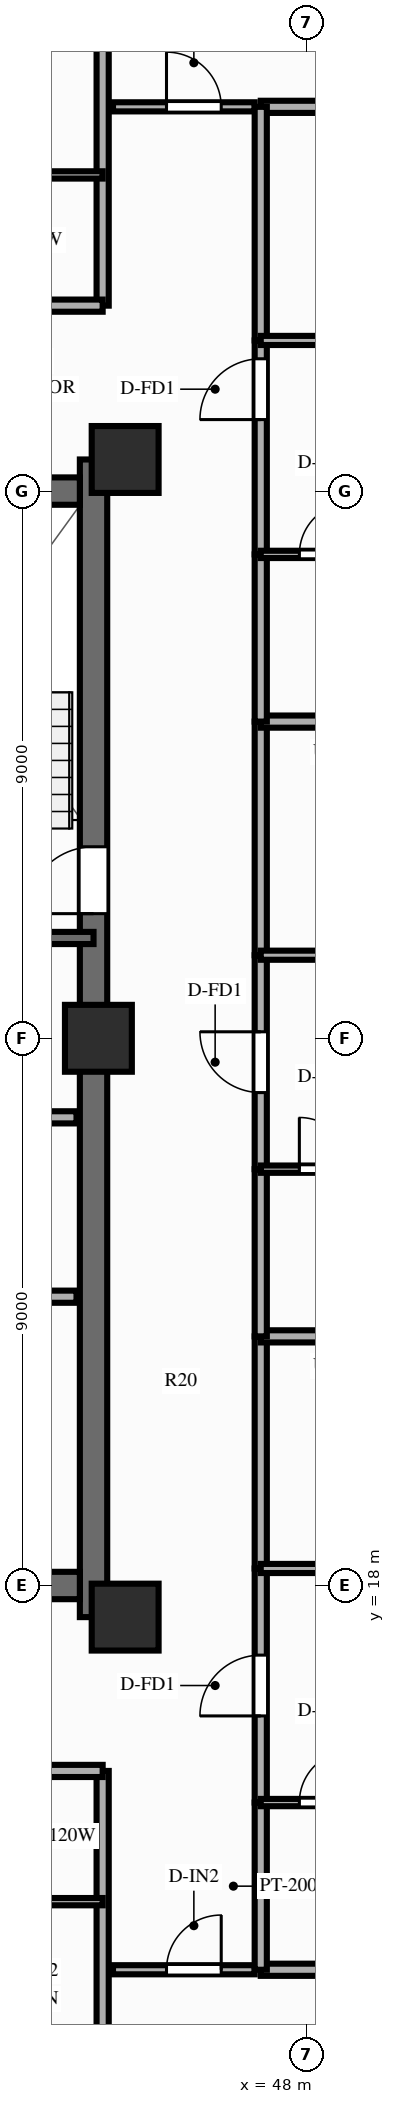
"""IFC4 building model, lengths in metres.
Left out: names, types, materials, properties, quantities, classifications, styles, units other than length and angle.
Written with IfcOpenShell. Run it as: python <this file> out.ifc"""

import sys

from ifc_helpers import new_model, si_unit, direction, frame, frame_2d, origin, origin_2d, place, context, subcontext, project, spatial, rectangle, extrude, source, transform, mapped, element, fill, save


model = new_model("IFC4")
c1 = context("Model", 3, precision=1e-05, world=origin(), true_north=direction((0.0, 1.0)))
c2 = subcontext(c1, "Body", "Model", "MODEL_VIEW")
j1 = project(units=[si_unit("LENGTHUNIT", "METRE"), si_unit("PLANEANGLEUNIT", "RADIAN")], contexts=[c1])
p1 = place(None, origin())
s1 = spatial("IfcSite", under=j1, at=p1, CompositionType="ELEMENT")
p2 = place(p1, origin())
s2 = spatial("IfcBuilding", under=s1, at=p2, CompositionType="ELEMENT")
p3 = place(p2, frame((0.0, 0.0, 199.6)))
s3 = spatial("IfcBuildingStorey", under=s2, at=p3, CompositionType="ELEMENT", Elevation=199.6)
p4 = place(p3, frame((44.5, 17.48, 0.0), z_axis=(0.0, 0.0, 1.0), x_axis=(0.0, 1.0, 0.0)))
e1 = element("IfcWall", 1, at=p4, inside=s3, PredefinedType="SHEAR", context=c2, shape_type="SweptSolid", body=[
    extrude(rectangle(XDim=19.04, YDim=0.45, at=frame_2d((9.52, 0.0))), origin(), (0.0, 0.0, 1.0), 3.0),
])
p5 = place(p4, frame((12.67, 0.0, 0.0), z_axis=(0.0, 0.0, 1.0), x_axis=(-1.0, 0.0, 0.0)))
e2 = element("IfcOpeningElement", 2, at=p5, cuts=e1, PredefinedType="OPENING", context=c2, shape_type="SweptSolid", body=[
    extrude(rectangle(XDim=1.1, YDim=2.15, at=frame_2d((0.55, 1.075))), frame((0.0, 0.237, 0.0), z_axis=(0.0, -1.0, 0.0), x_axis=(1.0, 0.0, 0.0)), (0.0, 0.0, 1.0), 0.474),
])
p6 = place(p3, frame((31.725, 18.0, 0.0), z_axis=(0.0, 0.0, 1.0), x_axis=(1.0, 0.0, 0.0)))
e3 = element("IfcWall", 3, at=p6, inside=s3, PredefinedType="SHEAR", context=c2, shape_type="SweptSolid", body=[
    extrude(rectangle(XDim=12.55, YDim=0.45, at=frame_2d((6.275, 0.0))), origin(), (0.0, 0.0, 1.0), 3.0),
])
p7 = place(p3, frame((31.725, 36.0, 0.0), z_axis=(0.0, 0.0, 1.0), x_axis=(1.0, 0.0, 0.0)))
e4 = element("IfcWall", 4, at=p7, inside=s3, PredefinedType="SHEAR", context=c2, shape_type="SweptSolid", body=[
    extrude(rectangle(XDim=12.55, YDim=0.45, at=frame_2d((6.275, 0.0))), origin(), (0.0, 0.0, 1.0), 3.0),
])
p8 = place(p7, frame((5.225, 0.0, 0.0), z_axis=(0.0, 0.0, 1.0), x_axis=(-1.0, 0.0, 0.0)))
e5 = element("IfcOpeningElement", 5, at=p8, cuts=e4, PredefinedType="OPENING", context=c2, shape_type="SweptSolid", body=[
    extrude(rectangle(XDim=1.4, YDim=2.15, at=frame_2d((0.7, 1.075))), frame((0.0, 0.237, 0.0), z_axis=(0.0, -1.0, 0.0), x_axis=(1.0, 0.0, 0.0)), (0.0, 0.0, 1.0), 0.474),
])
m1 = source(origin(), c2, "Body", "SweptSolid", [
    extrude(rectangle(XDim=1.1, YDim=1.1, at=origin_2d()), origin(), (0.0, 0.0, 1.0), 3.0),
])
for number, where, z_axis, x_axis in (
    (6, (45.02, 17.48, 0.0), (0.0, 0.0, 1.0), (1.0, 0.0, 0.0)),
    (7, (45.02, 36.52, 0.0), (0.0, 0.0, 1.0), (1.0, 0.0, 0.0)),
    (8, (44.58, 27.0, 0.0), (0.0, 0.0, 1.0), (1.0, 0.0, 0.0)),
):
    element("IfcColumn", number, at=place(p3, frame(where, z_axis=z_axis, x_axis=x_axis)), inside=s3, PredefinedType="COLUMN", context=c2, shape_type="MappedRepresentation", body=[
        mapped(m1, transform((0.0, 0.0, 0.0), scale=1.0)),
    ])
p9 = place(p3, frame((41.55, 22.75, 0.0), z_axis=(0.0, 0.0, 1.0), x_axis=(1.0, 0.0, 0.0)))
e9 = element("IfcWall", 9, at=p9, inside=s3, PredefinedType="PARTITIONING", context=c2, shape_type="SweptSolid", body=[
    extrude(rectangle(XDim=2.67, YDim=0.2, at=frame_2d((1.335, 0.0))), origin(), (0.0, 0.0, 1.0), 2.79),
])
p10 = place(p3, frame((41.55, 25.7, 0.0), z_axis=(0.0, 0.0, 1.0), x_axis=(1.0, 0.0, 0.0)))
e10 = element("IfcWall", 10, at=p10, inside=s3, PredefinedType="PARTITIONING", context=c2, shape_type="SweptSolid", body=[
    extrude(rectangle(XDim=2.67, YDim=0.2, at=frame_2d((1.335, 0.0))), origin(), (0.0, 0.0, 1.0), 2.14),
])
p11 = place(p3, frame((40.57, 28.65, 0.0), z_axis=(0.0, 0.0, 1.0), x_axis=(1.0, 0.0, 0.0)))
e11 = element("IfcWall", 11, at=p11, inside=s3, PredefinedType="SOLIDWALL", context=c2, shape_type="SweptSolid", body=[
    extrude(rectangle(XDim=3.93, YDim=0.2, at=frame_2d((1.965, 0.0))), origin(), (0.0, 0.0, 1.0), 2.79),
])
p12 = place(p3, frame((44.82, 11.68, 0.0), z_axis=(0.0, 0.0, 1.0), x_axis=(1.0, 0.0, 0.0)))
e12 = element("IfcWall", 12, at=p12, inside=s3, PredefinedType="PARTITIONING", context=c2, shape_type="SweptSolid", body=[
    extrude(rectangle(XDim=2.33, YDim=0.15, at=frame_2d((1.165, 0.0))), origin(), (0.0, 0.0, 1.0), 2.79),
])
p13 = place(p12, frame((0.88, 0.0, 0.0)))
e13 = element("IfcOpeningElement", 13, at=p13, cuts=e12, PredefinedType="OPENING", context=c2, shape_type="SweptSolid", body=[
    extrude(rectangle(XDim=0.9, YDim=2.1, at=frame_2d((0.45, 1.05))), frame((0.0, 0.087, 0.0), z_axis=(0.0, -1.0, 0.0), x_axis=(1.0, 0.0, 0.0)), (0.0, 0.0, 1.0), 0.174),
])
p14 = place(p3, frame((44.82, 42.32, 0.0), z_axis=(0.0, 0.0, 1.0), x_axis=(1.0, 0.0, 0.0)))
e14 = element("IfcWall", 14, at=p14, inside=s3, PredefinedType="PARTITIONING", context=c2, shape_type="SweptSolid", body=[
    extrude(rectangle(XDim=2.33, YDim=0.15, at=frame_2d((1.165, 0.0))), origin(), (0.0, 0.0, 1.0), 2.79),
])
p15 = place(p14, frame((0.88, 0.0, 0.0)))
e15 = element("IfcOpeningElement", 15, at=p15, cuts=e14, PredefinedType="OPENING", context=c2, shape_type="SweptSolid", body=[
    extrude(rectangle(XDim=0.9, YDim=2.1, at=frame_2d((0.45, 1.05))), frame((0.0, 0.087, 0.0), z_axis=(0.0, -1.0, 0.0), x_axis=(1.0, 0.0, 0.0)), (0.0, 0.0, 1.0), 0.174),
])
p16 = place(p3, frame((44.65, 14.95, 0.0), z_axis=(0.0, 0.0, 1.0), x_axis=(0.0, -1.0, 0.0)))
e16 = element("IfcWall", 16, at=p16, inside=s3, PredefinedType="PARTITIONING", context=c2, shape_type="SweptSolid", body=[
    extrude(rectangle(XDim=8.8, YDim=0.2, at=frame_2d((4.4, 0.0))), origin(), (0.0, 0.0, 1.0), 2.39),
])
p17 = place(p3, frame((41.8, 14.95, 0.0), z_axis=(0.0, 0.0, 1.0), x_axis=(1.0, 0.0, 0.0)))
e17 = element("IfcWall", 17, at=p17, inside=s3, PredefinedType="PARTITIONING", context=c2, shape_type="SweptSolid", body=[
    extrude(rectangle(XDim=2.85, YDim=0.2, at=frame_2d((1.425, 0.0))), origin(), (0.0, 0.0, 1.0), 2.79),
])
p18 = place(p3, frame((41.8, 12.8, 0.0), z_axis=(0.0, 0.0, 1.0), x_axis=(1.0, 0.0, 0.0)))
e18 = element("IfcWall", 18, at=p18, inside=s3, PredefinedType="PARTITIONING", context=c2, shape_type="SweptSolid", body=[
    extrude(rectangle(XDim=2.85, YDim=0.12, at=frame_2d((1.425, 0.0))), origin(), (0.0, 0.0, 1.0), 2.79),
])
p19 = place(p3, frame((44.65, 39.05, 0.0), z_axis=(0.0, 0.0, 1.0), x_axis=(0.0, 1.0, 0.0)))
e19 = element("IfcWall", 19, at=p19, inside=s3, PredefinedType="PARTITIONING", context=c2, shape_type="SweptSolid", body=[
    extrude(rectangle(XDim=8.8, YDim=0.2, at=frame_2d((4.4, 0.0))), origin(), (0.0, 0.0, 1.0), 2.39),
])
p20 = place(p3, frame((42.085, 39.05, 0.0), z_axis=(0.0, 0.0, 1.0), x_axis=(1.0, 0.0, 0.0)))
e20 = element("IfcWall", 20, at=p20, inside=s3, PredefinedType="PARTITIONING", context=c2, shape_type="SweptSolid", body=[
    extrude(rectangle(XDim=2.564, YDim=0.2, at=frame_2d((1.282, 0.0))), origin(), (0.0, 0.0, 1.0), 2.79),
])
p21 = place(p3, frame((42.085, 41.2, 0.0), z_axis=(0.0, 0.0, 1.0), x_axis=(1.0, 0.0, 0.0)))
e21 = element("IfcWall", 21, at=p21, inside=s3, PredefinedType="PARTITIONING", context=c2, shape_type="SweptSolid", body=[
    extrude(rectangle(XDim=2.564, YDim=0.12, at=frame_2d((1.282, 0.0))), origin(), (0.0, 0.0, 1.0), 2.79),
])
for number, where, z_axis, x_axis in (
    (22, (47.25, 11.68, 0.0), (0.0, 0.0, 1.0), (1.0, 0.0, 0.0)),
    (23, (47.25, 42.32, 0.0), (0.0, 0.0, 1.0), (1.0, 0.0, 0.0)),
):
    element("IfcWall", number, at=place(p3, frame(where, z_axis=z_axis, x_axis=x_axis)), inside=s3, PredefinedType="PARTITIONING", context=c2, shape_type="SweptSolid", body=[
        extrude(rectangle(XDim=9.1, YDim=0.2, at=frame_2d((4.55, 0.0))), origin(), (0.0, 0.0, 1.0), 2.79),
    ])
p22 = place(p3, frame((47.25, 11.68, 0.0), z_axis=(0.0, 0.0, 1.0), x_axis=(0.0, 1.0, 0.0)))
e24 = element("IfcWall", 24, at=p22, inside=s3, PredefinedType="PARTITIONING", context=c2, shape_type="SweptSolid", body=[
    extrude(rectangle(XDim=2.75, YDim=0.2, at=frame_2d((1.375, 0.0))), origin(), (0.0, 0.0, 1.0), 2.79),
])
p23 = place(p3, frame((47.25, 14.43, 0.0), z_axis=(0.0, 0.0, 1.0), x_axis=(0.0, 1.0, 0.0)))
e25 = element("IfcWall", 25, at=p23, inside=s3, PredefinedType="PARTITIONING", context=c2, shape_type="SweptSolid", body=[
    extrude(rectangle(XDim=3.85, YDim=0.2, at=frame_2d((1.925, 0.0))), origin(), (0.0, 0.0, 1.0), 2.79),
])
p24 = place(p23, frame((1.425, 0.0, 0.0)))
e26 = element("IfcOpeningElement", 26, at=p24, cuts=e25, PredefinedType="OPENING", context=c2, shape_type="SweptSolid", body=[
    extrude(rectangle(XDim=1.0, YDim=2.15, at=frame_2d((0.5, 1.075))), frame((0.0, 0.112, 0.0), z_axis=(0.0, -1.0, 0.0), x_axis=(1.0, 0.0, 0.0)), (0.0, 0.0, 1.0), 0.224),
])
p25 = place(p3, frame((47.25, 18.28, 0.0), z_axis=(0.0, 0.0, 1.0), x_axis=(0.0, 1.0, 0.0)))
e27 = element("IfcWall", 27, at=p25, inside=s3, PredefinedType="PARTITIONING", context=c2, shape_type="SweptSolid", body=[
    extrude(rectangle(XDim=3.818, YDim=0.2, at=frame_2d((1.909, 0.0))), origin(), (0.0, 0.0, 1.0), 2.79),
])
p26 = place(p3, frame((47.25, 14.43, 0.0), z_axis=(0.0, 0.0, 1.0), x_axis=(1.0, 0.0, 0.0)))
e28 = element("IfcWall", 28, at=p26, inside=s3, PredefinedType="PARTITIONING", context=c2, shape_type="SweptSolid", body=[
    extrude(rectangle(XDim=2.12, YDim=0.12, at=frame_2d((1.06, 0.0))), origin(), (0.0, 0.0, 1.0), 2.79),
])
p27 = place(p26, frame((0.635, 0.0, 0.0)))
e29 = element("IfcOpeningElement", 29, at=p27, cuts=e28, PredefinedType="OPENING", context=c2, shape_type="SweptSolid", body=[
    extrude(rectangle(XDim=0.85, YDim=2.05, at=frame_2d((0.425, 1.025))), frame((0.0, 0.072, 0.0), z_axis=(0.0, -1.0, 0.0), x_axis=(1.0, 0.0, 0.0)), (0.0, 0.0, 1.0), 0.144),
])
p28 = place(p3, frame((47.25, 18.28, 0.0), z_axis=(0.0, 0.0, 1.0), x_axis=(1.0, 0.0, 0.0)))
e30 = element("IfcWall", 30, at=p28, inside=s3, PredefinedType="PARTITIONING", context=c2, shape_type="SweptSolid", body=[
    extrude(rectangle(XDim=3.08, YDim=0.15, at=frame_2d((1.54, 0.0))), origin(), (0.0, 0.0, 1.0), 2.79),
])
p29 = place(p28, frame((1.09, 0.0, 0.0)))
e31 = element("IfcOpeningElement", 31, at=p29, cuts=e30, PredefinedType="OPENING", context=c2, shape_type="SweptSolid", body=[
    extrude(rectangle(XDim=0.9, YDim=2.1, at=frame_2d((0.45, 1.05))), frame((0.0, 0.087, 0.0), z_axis=(0.0, -1.0, 0.0), x_axis=(1.0, 0.0, 0.0)), (0.0, 0.0, 1.0), 0.174),
])
p30 = place(p3, frame((47.25, 22.098, 0.0), z_axis=(0.0, 0.0, 1.0), x_axis=(1.0, 0.0, 0.0)))
e32 = element("IfcWall", 32, at=p30, inside=s3, PredefinedType="PARTITIONING", context=c2, shape_type="SweptSolid", body=[
    extrude(rectangle(XDim=9.1, YDim=0.2, at=frame_2d((4.55, 0.0))), origin(), (0.0, 0.0, 1.0), 2.39),
])
p31 = place(p3, frame((47.25, 22.098, 0.0), z_axis=(0.0, 0.0, 1.0), x_axis=(0.0, 1.0, 0.0)))
e33 = element("IfcWall", 33, at=p31, inside=s3, PredefinedType="PARTITIONING", context=c2, shape_type="SweptSolid", body=[
    extrude(rectangle(XDim=2.75, YDim=0.2, at=frame_2d((1.375, 0.0))), origin(), (0.0, 0.0, 1.0), 2.79),
])
p32 = place(p3, frame((47.25, 24.848, 0.0), z_axis=(0.0, 0.0, 1.0), x_axis=(0.0, 1.0, 0.0)))
e34 = element("IfcWall", 34, at=p32, inside=s3, PredefinedType="PARTITIONING", context=c2, shape_type="SweptSolid", body=[
    extrude(rectangle(XDim=3.519, YDim=0.2, at=frame_2d((1.759, 0.0))), origin(), (0.0, 0.0, 1.0), 2.79),
])
p33 = place(p32, frame((1.26, 0.0, 0.0)))
e35 = element("IfcOpeningElement", 35, at=p33, cuts=e34, PredefinedType="OPENING", context=c2, shape_type="SweptSolid", body=[
    extrude(rectangle(XDim=1.0, YDim=2.15, at=frame_2d((0.5, 1.075))), frame((0.0, 0.112, 0.0), z_axis=(0.0, -1.0, 0.0), x_axis=(1.0, 0.0, 0.0)), (0.0, 0.0, 1.0), 0.224),
])
p34 = place(p3, frame((47.25, 28.366, 0.0), z_axis=(0.0, 0.0, 1.0), x_axis=(0.0, 1.0, 0.0)))
e36 = element("IfcWall", 36, at=p34, inside=s3, PredefinedType="PARTITIONING", context=c2, shape_type="SweptSolid", body=[
    extrude(rectangle(XDim=3.842, YDim=0.2, at=frame_2d((1.921, 0.0))), origin(), (0.0, 0.0, 1.0), 2.79),
])
p35 = place(p3, frame((47.25, 24.848, 0.0), z_axis=(0.0, 0.0, 1.0), x_axis=(1.0, 0.0, 0.0)))
e37 = element("IfcWall", 37, at=p35, inside=s3, PredefinedType="PARTITIONING", context=c2, shape_type="SweptSolid", body=[
    extrude(rectangle(XDim=2.12, YDim=0.12, at=frame_2d((1.06, 0.0))), origin(), (0.0, 0.0, 1.0), 2.79),
])
p36 = place(p35, frame((0.635, 0.0, 0.0)))
e38 = element("IfcOpeningElement", 38, at=p36, cuts=e37, PredefinedType="OPENING", context=c2, shape_type="SweptSolid", body=[
    extrude(rectangle(XDim=0.85, YDim=2.05, at=frame_2d((0.425, 1.025))), frame((0.0, 0.072, 0.0), z_axis=(0.0, -1.0, 0.0), x_axis=(1.0, 0.0, 0.0)), (0.0, 0.0, 1.0), 0.144),
])
p37 = place(p3, frame((47.25, 28.366, 0.0), z_axis=(0.0, 0.0, 1.0), x_axis=(1.0, 0.0, 0.0)))
e39 = element("IfcWall", 39, at=p37, inside=s3, PredefinedType="PARTITIONING", context=c2, shape_type="SweptSolid", body=[
    extrude(rectangle(XDim=3.08, YDim=0.15, at=frame_2d((1.54, 0.0))), origin(), (0.0, 0.0, 1.0), 2.79),
])
p38 = place(p37, frame((1.09, 0.0, 0.0)))
e40 = element("IfcOpeningElement", 40, at=p38, cuts=e39, PredefinedType="OPENING", context=c2, shape_type="SweptSolid", body=[
    extrude(rectangle(XDim=0.9, YDim=2.1, at=frame_2d((0.45, 1.05))), frame((0.0, 0.087, 0.0), z_axis=(0.0, -1.0, 0.0), x_axis=(1.0, 0.0, 0.0)), (0.0, 0.0, 1.0), 0.174),
])
p39 = place(p3, frame((47.25, 32.209, 0.0), z_axis=(0.0, 0.0, 1.0), x_axis=(1.0, 0.0, 0.0)))
e41 = element("IfcWall", 41, at=p39, inside=s3, PredefinedType="PARTITIONING", context=c2, shape_type="SweptSolid", body=[
    extrude(rectangle(XDim=9.1, YDim=0.2, at=frame_2d((4.55, 0.0))), origin(), (0.0, 0.0, 1.0), 2.39),
])
p40 = place(p3, frame((47.25, 32.209, 0.0), z_axis=(0.0, 0.0, 1.0), x_axis=(0.0, 1.0, 0.0)))
e42 = element("IfcWall", 42, at=p40, inside=s3, PredefinedType="PARTITIONING", context=c2, shape_type="SweptSolid", body=[
    extrude(rectangle(XDim=2.75, YDim=0.2, at=frame_2d((1.375, 0.0))), origin(), (0.0, 0.0, 1.0), 2.79),
])
p41 = place(p3, frame((47.25, 34.959, 0.0), z_axis=(0.0, 0.0, 1.0), x_axis=(0.0, 1.0, 0.0)))
e43 = element("IfcWall", 43, at=p41, inside=s3, PredefinedType="PARTITIONING", context=c2, shape_type="SweptSolid", body=[
    extrude(rectangle(XDim=3.519, YDim=0.2, at=frame_2d((1.76, 0.0))), origin(), (0.0, 0.0, 1.0), 2.79),
])
p42 = place(p41, frame((2.217, 0.0, 0.0)))
e44 = element("IfcOpeningElement", 44, at=p42, cuts=e43, PredefinedType="OPENING", context=c2, shape_type="SweptSolid", body=[
    extrude(rectangle(XDim=1.0, YDim=2.15, at=frame_2d((0.5, 1.075))), frame((0.0, 0.112, 0.0), z_axis=(0.0, -1.0, 0.0), x_axis=(1.0, 0.0, 0.0)), (0.0, 0.0, 1.0), 0.224),
])
p43 = place(p3, frame((47.25, 38.478, 0.0), z_axis=(0.0, 0.0, 1.0), x_axis=(0.0, 1.0, 0.0)))
e45 = element("IfcWall", 45, at=p43, inside=s3, PredefinedType="PARTITIONING", context=c2, shape_type="SweptSolid", body=[
    extrude(rectangle(XDim=3.842, YDim=0.2, at=frame_2d((1.921, 0.0))), origin(), (0.0, 0.0, 1.0), 2.79),
])
p44 = place(p3, frame((47.25, 34.959, 0.0), z_axis=(0.0, 0.0, 1.0), x_axis=(1.0, 0.0, 0.0)))
e46 = element("IfcWall", 46, at=p44, inside=s3, PredefinedType="PARTITIONING", context=c2, shape_type="SweptSolid", body=[
    extrude(rectangle(XDim=2.12, YDim=0.12, at=frame_2d((1.06, 0.0))), origin(), (0.0, 0.0, 1.0), 2.79),
])
p45 = place(p44, frame((0.635, 0.0, 0.0)))
e47 = element("IfcOpeningElement", 47, at=p45, cuts=e46, PredefinedType="OPENING", context=c2, shape_type="SweptSolid", body=[
    extrude(rectangle(XDim=0.85, YDim=2.05, at=frame_2d((0.425, 1.025))), frame((0.0, 0.072, 0.0), z_axis=(0.0, -1.0, 0.0), x_axis=(1.0, 0.0, 0.0)), (0.0, 0.0, 1.0), 0.144),
])
p46 = place(p3, frame((47.25, 38.478, 0.0), z_axis=(0.0, 0.0, 1.0), x_axis=(1.0, 0.0, 0.0)))
e48 = element("IfcWall", 48, at=p46, inside=s3, PredefinedType="PARTITIONING", context=c2, shape_type="SweptSolid", body=[
    extrude(rectangle(XDim=3.08, YDim=0.15, at=frame_2d((1.54, 0.0))), origin(), (0.0, 0.0, 1.0), 2.79),
])
p47 = place(p46, frame((1.09, 0.0, 0.0)))
e49 = element("IfcOpeningElement", 49, at=p47, cuts=e48, PredefinedType="OPENING", context=c2, shape_type="SweptSolid", body=[
    extrude(rectangle(XDim=0.9, YDim=2.1, at=frame_2d((0.45, 1.05))), frame((0.0, 0.087, 0.0), z_axis=(0.0, -1.0, 0.0), x_axis=(1.0, 0.0, 0.0)), (0.0, 0.0, 1.0), 0.174),
])
m2 = source(origin(), c2, "Body", "SweptSolid", [
    extrude(rectangle(XDim=1.1, YDim=2.15, at=frame_2d((0.55, 1.075))), frame((0.0, 0.025, 0.0), z_axis=(0.0, -1.0, 0.0), x_axis=(1.0, 0.0, 0.0)), (0.0, 0.0, 1.0), 0.05),
])
p48 = place(p5, origin())
e50 = element("IfcDoor", 50, at=p48, inside=s3, OperationType="SINGLE_SWING_RIGHT", PredefinedType="DOOR", context=c2, shape_type="MappedRepresentation", body=[
    mapped(m2, transform((0.0, 0.0, 0.0), scale=1.0)),
])
fill(e2, e50)
m3 = source(origin(), c2, "Body", "SweptSolid", [
    extrude(rectangle(XDim=0.9, YDim=2.1, at=frame_2d((0.45, 1.05))), frame((0.0, 0.025, 0.0), z_axis=(0.0, -1.0, 0.0), x_axis=(1.0, 0.0, 0.0)), (0.0, 0.0, 1.0), 0.05),
])
p49 = place(p13, origin())
e51 = element("IfcDoor", 51, at=p49, inside=s3, OperationType="SINGLE_SWING_RIGHT", PredefinedType="DOOR", context=c2, shape_type="MappedRepresentation", body=[
    mapped(m3, transform((0.0, 0.0, 0.0), scale=1.0)),
])
fill(e13, e51)
p50 = place(p15, origin())
e52 = element("IfcDoor", 52, at=p50, inside=s3, OperationType="SINGLE_SWING_LEFT", PredefinedType="DOOR", context=c2, shape_type="MappedRepresentation", body=[
    mapped(m3, transform((0.0, 0.0, 0.0), scale=1.0)),
])
fill(e15, e52)
m4 = source(origin(), c2, "Body", "SweptSolid", [
    extrude(rectangle(XDim=1.0, YDim=2.15, at=frame_2d((0.5, 1.075))), frame((0.0, 0.025, 0.0), z_axis=(0.0, -1.0, 0.0), x_axis=(1.0, 0.0, 0.0)), (0.0, 0.0, 1.0), 0.05),
])
p51 = place(p24, origin())
e53 = element("IfcDoor", 53, at=p51, inside=s3, OperationType="SINGLE_SWING_LEFT", PredefinedType="DOOR", context=c2, shape_type="MappedRepresentation", body=[
    mapped(m4, transform((0.0, 0.0, 0.0), scale=1.0)),
])
fill(e26, e53)
m5 = source(origin(), c2, "Body", "SweptSolid", [
    extrude(rectangle(XDim=0.85, YDim=2.05, at=frame_2d((0.425, 1.025))), frame((0.0, 0.025, 0.0), z_axis=(0.0, -1.0, 0.0), x_axis=(1.0, 0.0, 0.0)), (0.0, 0.0, 1.0), 0.05),
])
p52 = place(p27, origin())
e54 = element("IfcDoor", 54, at=p52, inside=s3, OperationType="SINGLE_SWING_RIGHT", PredefinedType="DOOR", context=c2, shape_type="MappedRepresentation", body=[
    mapped(m5, transform((0.0, 0.0, 0.0), scale=1.0)),
])
fill(e29, e54)
p53 = place(p33, origin())
e55 = element("IfcDoor", 55, at=p53, inside=s3, OperationType="SINGLE_SWING_RIGHT", PredefinedType="DOOR", context=c2, shape_type="MappedRepresentation", body=[
    mapped(m4, transform((0.0, 0.0, 0.0), scale=1.0)),
])
fill(e35, e55)
p54 = place(p36, origin())
e56 = element("IfcDoor", 56, at=p54, inside=s3, OperationType="SINGLE_SWING_LEFT", PredefinedType="DOOR", context=c2, shape_type="MappedRepresentation", body=[
    mapped(m5, transform((0.0, 0.0, 0.0), scale=1.0)),
])
fill(e38, e56)
p55 = place(p42, origin())
e57 = element("IfcDoor", 57, at=p55, inside=s3, OperationType="SINGLE_SWING_LEFT", PredefinedType="DOOR", context=c2, shape_type="MappedRepresentation", body=[
    mapped(m4, transform((0.0, 0.0, 0.0), scale=1.0)),
])
fill(e44, e57)
p56 = place(p45, origin())
e58 = element("IfcDoor", 58, at=p56, inside=s3, OperationType="SINGLE_SWING_RIGHT", PredefinedType="DOOR", context=c2, shape_type="MappedRepresentation", body=[
    mapped(m5, transform((0.0, 0.0, 0.0), scale=1.0)),
])
fill(e47, e58)
save(model, sys.argv[1])
